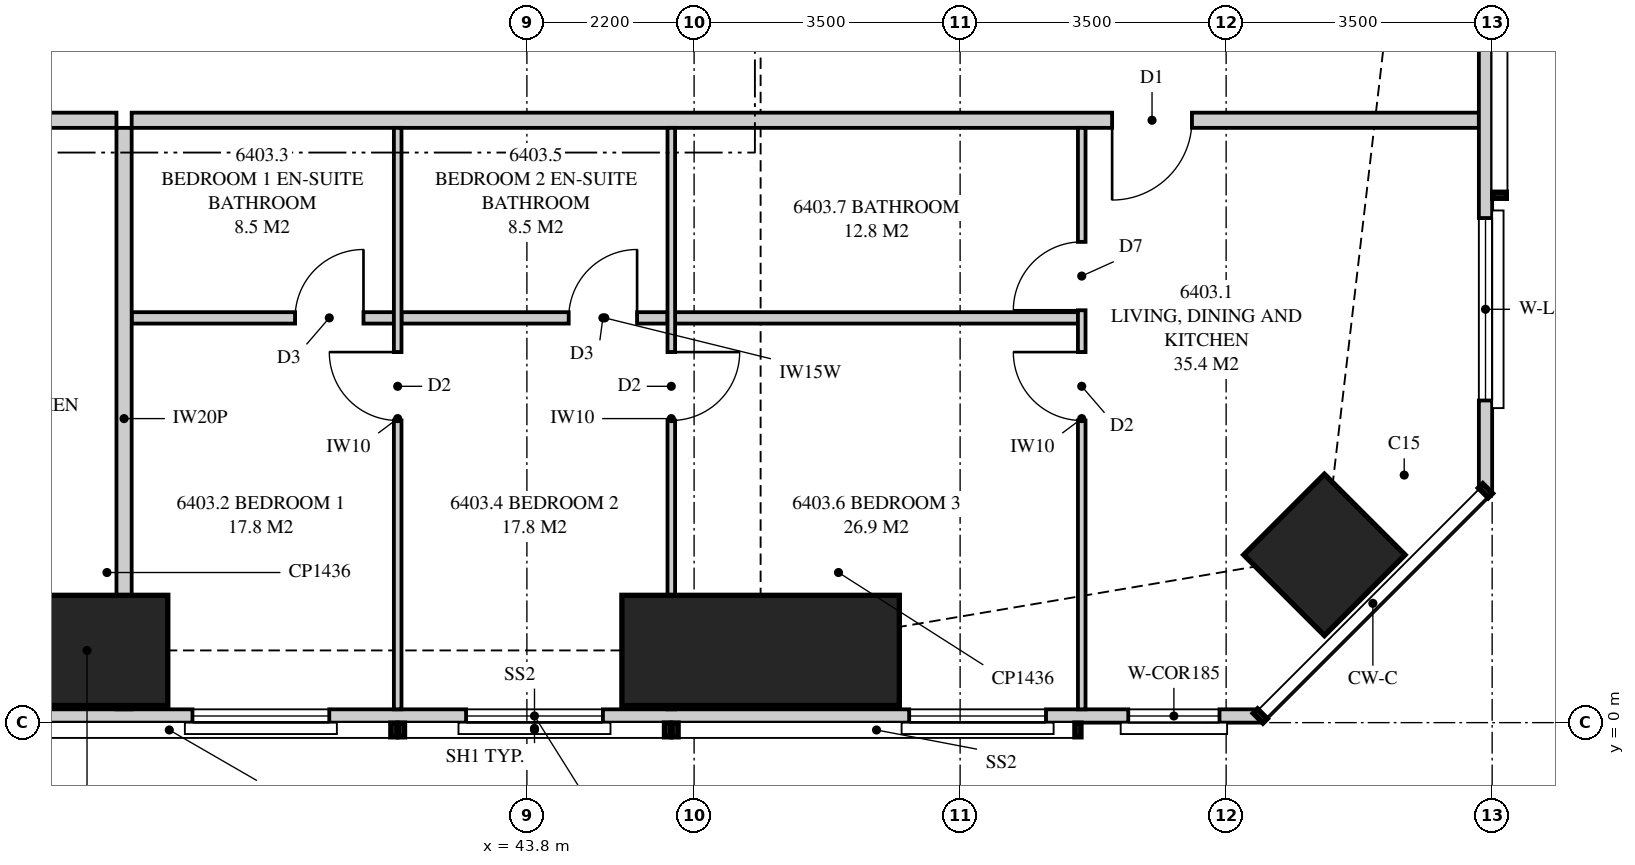
"""IFC4 building model, lengths in metres.
Left out: names, types, materials, properties, quantities, classifications, styles, units other than length and angle.
Written with IfcOpenShell. Run it as: python <this file> out.ifc"""

import sys

from ifc_helpers import new_model, si_unit, direction, frame, frame_2d, origin, origin_2d, place, context, subcontext, project, spatial, polyline, rectangle, outline, extrude, element, fill, save


model = new_model("IFC4")
c1 = context("Model", 3, precision=1e-05, world=origin(), true_north=direction((0.0, 1.0)))
c2 = subcontext(c1, "Body", "Model", "MODEL_VIEW")
j1 = project(units=[si_unit("LENGTHUNIT", "METRE"), si_unit("PLANEANGLEUNIT", "RADIAN")], contexts=[c1])
p1 = place(None, origin())
s1 = spatial("IfcSite", under=j1, at=p1, CompositionType="ELEMENT")
p2 = place(p1, origin())
s2 = spatial("IfcBuilding", under=s1, at=p2, CompositionType="ELEMENT")
p3 = place(p2, frame((0.0, 0.0, 235.45)))
s3 = spatial("IfcBuildingStorey", under=s2, at=p3, CompositionType="ELEMENT", Elevation=235.45)
for number, where, z_axis, x_axis in (
    (1, (37.25, 0.95, 0.0), (0.0, 0.0, 1.0), (0.0, 1.0, 0.0)),
    (2, (46.875, 0.95, 0.0), (0.0, 0.0, 1.0), (0.0, 1.0, 0.0)),
):
    element("IfcColumn", number, at=place(p3, frame(where, z_axis=z_axis, x_axis=x_axis)), inside=s3, PredefinedType="COLUMN", context=c2, shape_type="SweptSolid", body=[
        extrude(rectangle(XDim=1.45, YDim=3.65, at=origin_2d()), origin(), (0.0, 0.0, 1.0), 3.5),
    ])
p4 = place(p3, frame((54.293, 2.207, 0.0), z_axis=(0.0, 0.0, 1.0), x_axis=(0.707106781187, 0.707106781187, 0.0)))
e3 = element("IfcColumn", 3, at=p4, inside=s3, PredefinedType="COLUMN", context=c2, shape_type="SweptSolid", body=[
    extrude(rectangle(XDim=1.5, YDim=1.5, at=origin_2d()), origin(), (0.0, 0.0, 1.0), 3.5),
])
p5 = place(p3, frame((19.851, 0.087, 0.0), z_axis=(0.0, 0.0, 1.0), x_axis=(1.0, 0.0, 0.0)))
e4 = element("IfcWall", 4, at=p5, inside=s3, PredefinedType="SOLIDWALL", context=c2, shape_type="SweptSolid", body=[
    extrude(outline(polyline([(0.0, 0.0), (33.597, 0.0), (33.597, 3.26), (27.239, 3.26), (27.239, 2.3), (27.155, 2.3), (27.155, 3.26), (27.024, 3.26), (27.024, 2.3), (7.774, 2.3), (7.774, 3.26), (7.642, 3.26), (7.642, 2.3), (7.559, 2.3), (7.559, 3.26), (0.0, 3.26), (0.0, 0.0)])), frame((0.0, 0.087, 0.0), z_axis=(0.0, -1.0, 0.0), x_axis=(1.0, 0.0, 0.0)), (0.0, 0.0, 1.0), 0.175),
])
p6 = place(p5, frame((3.373, 0.0, 0.4)))
e5 = element("IfcOpeningElement", 5, at=p6, cuts=e4, PredefinedType="OPENING", context=c2, shape_type="SweptSolid", body=[
    extrude(rectangle(XDim=2.4, YDim=1.85, at=frame_2d((1.2, 0.925))), frame((0.0, 0.097, 0.0), z_axis=(0.0, -1.0, 0.0), x_axis=(1.0, 0.0, 0.0)), (0.0, 0.0, 1.0), 0.195),
])
p7 = place(p5, frame((10.349, 0.0, 0.4)))
e6 = element("IfcOpeningElement", 6, at=p7, cuts=e4, PredefinedType="OPENING", context=c2, shape_type="SweptSolid", body=[
    extrude(rectangle(XDim=1.8, YDim=1.85, at=frame_2d((0.9, 0.925))), frame((0.0, 0.097, 0.0), z_axis=(0.0, -1.0, 0.0), x_axis=(1.0, 0.0, 0.0)), (0.0, 0.0, 1.0), 0.195),
])
p8 = place(p5, frame((13.289, 0.0, 0.0)))
e7 = element("IfcOpeningElement", 7, at=p8, cuts=e4, PredefinedType="OPENING", context=c2, shape_type="SweptSolid", body=[
    extrude(rectangle(XDim=1.8, YDim=2.25, at=frame_2d((0.9, 1.125))), frame((0.0, 0.097, 0.0), z_axis=(0.0, -1.0, 0.0), x_axis=(1.0, 0.0, 0.0)), (0.0, 0.0, 1.0), 0.195),
])
p9 = place(p5, frame((19.549, 0.0, 0.4)))
e8 = element("IfcOpeningElement", 8, at=p9, cuts=e4, PredefinedType="OPENING", context=c2, shape_type="SweptSolid", body=[
    extrude(rectangle(XDim=1.8, YDim=1.85, at=frame_2d((0.9, 0.925))), frame((0.0, 0.097, 0.0), z_axis=(0.0, -1.0, 0.0), x_axis=(1.0, 0.0, 0.0)), (0.0, 0.0, 1.0), 0.195),
])
p10 = place(p5, frame((23.149, 0.0, 0.4)))
e9 = element("IfcOpeningElement", 9, at=p10, cuts=e4, PredefinedType="OPENING", context=c2, shape_type="SweptSolid", body=[
    extrude(rectangle(XDim=1.8, YDim=1.85, at=frame_2d((0.9, 0.925))), frame((0.0, 0.097, 0.0), z_axis=(0.0, -1.0, 0.0), x_axis=(1.0, 0.0, 0.0)), (0.0, 0.0, 1.0), 0.195),
])
p11 = place(p5, frame((28.979, 0.0, 0.4)))
e10 = element("IfcOpeningElement", 10, at=p11, cuts=e4, PredefinedType="OPENING", context=c2, shape_type="SweptSolid", body=[
    extrude(rectangle(XDim=1.8, YDim=1.85, at=frame_2d((0.9, 0.925))), frame((0.0, 0.097, 0.0), z_axis=(0.0, -1.0, 0.0), x_axis=(1.0, 0.0, 0.0)), (0.0, 0.0, 1.0), 0.195),
])
p12 = place(p5, frame((31.861, 0.0, 0.4)))
e11 = element("IfcOpeningElement", 11, at=p12, cuts=e4, PredefinedType="OPENING", context=c2, shape_type="SweptSolid", body=[
    extrude(rectangle(XDim=1.2, YDim=1.85, at=frame_2d((0.6, 0.925))), frame((0.0, 0.097, 0.0), z_axis=(0.0, -1.0, 0.0), x_axis=(1.0, 0.0, 0.0)), (0.0, 0.0, 1.0), 0.195),
])
p13 = place(p3, frame((56.413, 3.051, 0.0), z_axis=(0.0, 0.0, 1.0), x_axis=(0.0, 1.0, 0.0)))
e12 = element("IfcWall", 12, at=p13, inside=s3, PredefinedType="SOLIDWALL", context=c2, shape_type="SweptSolid", body=[
    extrude(outline(polyline([(0.0, 0.0), (27.897, 0.0), (27.897, 3.26), (22.157, 3.26), (22.157, 2.3), (22.092, 2.3), (22.092, 3.26), (21.949, 3.26), (21.949, 2.3), (9.949, 2.3), (9.949, 3.26), (9.858, 3.26), (9.858, 2.3), (9.688, 2.3), (9.688, 3.26), (0.0, 3.26), (0.0, 0.0)])), frame((0.0, 0.087, 0.0), z_axis=(0.0, -1.0, 0.0), x_axis=(1.0, 0.0, 0.0)), (0.0, 0.0, 1.0), 0.175),
])
p14 = place(p13, frame((1.187, 0.0, 0.4)))
e13 = element("IfcOpeningElement", 13, at=p14, cuts=e12, PredefinedType="OPENING", context=c2, shape_type="SweptSolid", body=[
    extrude(rectangle(XDim=2.4, YDim=1.85, at=frame_2d((1.2, 0.925))), frame((0.0, 0.097, 0.0), z_axis=(0.0, -1.0, 0.0), x_axis=(1.0, 0.0, 0.0)), (0.0, 0.0, 1.0), 0.195),
])
p15 = place(p13, frame((11.897, 0.0, 0.4)))
e14 = element("IfcOpeningElement", 14, at=p15, cuts=e12, PredefinedType="OPENING", context=c2, shape_type="SweptSolid", body=[
    extrude(rectangle(XDim=1.8, YDim=1.85, at=frame_2d((0.9, 0.925))), frame((0.0, 0.097, 0.0), z_axis=(0.0, -1.0, 0.0), x_axis=(1.0, 0.0, 0.0)), (0.0, 0.0, 1.0), 0.195),
])
p16 = place(p13, frame((14.824, 0.0, 0.0)))
e15 = element("IfcOpeningElement", 15, at=p16, cuts=e12, PredefinedType="OPENING", context=c2, shape_type="SweptSolid", body=[
    extrude(rectangle(XDim=1.8, YDim=2.25, at=frame_2d((0.9, 1.125))), frame((0.0, 0.097, 0.0), z_axis=(0.0, -1.0, 0.0), x_axis=(1.0, 0.0, 0.0)), (0.0, 0.0, 1.0), 0.195),
])
p17 = place(p13, frame((18.224, 0.0, 0.4)))
e16 = element("IfcOpeningElement", 16, at=p17, cuts=e12, PredefinedType="OPENING", context=c2, shape_type="SweptSolid", body=[
    extrude(rectangle(XDim=1.8, YDim=1.85, at=frame_2d((0.9, 0.925))), frame((0.0, 0.097, 0.0), z_axis=(0.0, -1.0, 0.0), x_axis=(1.0, 0.0, 0.0)), (0.0, 0.0, 1.0), 0.195),
])
p18 = place(p3, frame((38.5, 0.175, 0.0), z_axis=(0.0, 0.0, 1.0), x_axis=(0.0, 1.0, 0.0)))
e17 = element("IfcWall", 17, at=p18, inside=s3, PredefinedType="PARTITIONING", context=c2, shape_type="SweptSolid", body=[
    extrude(outline(polyline([(0.529, 2.3), (0.0, 2.3), (0.0, 0.0), (0.529, 0.0), (0.529, 0.281), (1.021, 0.281), (1.021, 0.0), (7.65, 0.0), (7.65, 2.66), (1.685, 2.66), (1.685, 2.3), (1.021, 2.3), (1.021, 2.019), (0.529, 2.019), (0.529, 2.3)])), frame((0.0, 0.1, 0.0), z_axis=(0.0, -1.0, 0.0), x_axis=(1.0, 0.0, 0.0)), (0.0, 0.0, 1.0), 0.2),
])
p19 = place(p3, frame((29.4, 7.925, 0.0), z_axis=(0.0, 0.0, 1.0), x_axis=(1.0, 0.0, 0.0)))
e18 = element("IfcWall", 18, at=p19, inside=s3, PredefinedType="PARTITIONING", context=c2, shape_type="SweptSolid", body=[
    extrude(outline(polyline([(0.0, 0.0), (9.0, 0.0), (9.0, 3.26), (9.0, 2.66), (6.54, 2.66), (6.54, 3.26), (0.0, 3.26), (0.0, 0.0)])), frame((0.0, 0.1, 0.0), z_axis=(0.0, -1.0, 0.0), x_axis=(1.0, 0.0, 0.0)), (0.0, 0.0, 1.0), 0.2),
])
p20 = place(p19, frame((4.0, 0.0, 0.0)))
e19 = element("IfcOpeningElement", 19, at=p20, cuts=e18, PredefinedType="OPENING", context=c2, shape_type="SweptSolid", body=[
    extrude(rectangle(XDim=1.05, YDim=2.2, at=frame_2d((0.525, 1.1))), frame((0.0, 0.11, 0.0), z_axis=(0.0, -1.0, 0.0), x_axis=(1.0, 0.0, 0.0)), (0.0, 0.0, 1.0), 0.22),
])
p21 = place(p3, frame((38.6, 7.925, 0.0), z_axis=(0.0, 0.0, 1.0), x_axis=(1.0, 0.0, 0.0)))
e20 = element("IfcWall", 20, at=p21, inside=s3, PredefinedType="PARTITIONING", context=c2, shape_type="SweptSolid", body=[
    extrude(outline(polyline([(0.0, 0.0), (17.725, 0.0), (17.725, 3.26), (17.275, 3.26), (17.275, 2.3), (15.443, 2.3), (15.443, 3.26), (9.585, 3.26), (9.585, 2.66), (6.965, 2.66), (6.965, 3.26), (0.0, 3.26), (0.0, 0.0)])), frame((0.0, 0.1, 0.0), z_axis=(0.0, -1.0, 0.0), x_axis=(1.0, 0.0, 0.0)), (0.0, 0.0, 1.0), 0.2),
])
p22 = place(p21, frame((12.9, 0.0, 0.0)))
e21 = element("IfcOpeningElement", 21, at=p22, cuts=e20, PredefinedType="OPENING", context=c2, shape_type="SweptSolid", body=[
    extrude(rectangle(XDim=1.05, YDim=2.2, at=frame_2d((0.525, 1.1))), frame((0.0, 0.11, 0.0), z_axis=(0.0, -1.0, 0.0), x_axis=(1.0, 0.0, 0.0)), (0.0, 0.0, 1.0), 0.22),
])
p23 = place(p3, frame((42.1, 0.175, 0.0), z_axis=(0.0, 0.0, 1.0), x_axis=(0.0, 1.0, 0.0)))
e22 = element("IfcWall", 22, at=p23, inside=s3, PredefinedType="PARTITIONING", context=c2, shape_type="SweptSolid", body=[
    extrude(outline(polyline([(0.0, 0.0), (7.65, 0.0), (7.65, 3.26), (1.635, 3.26), (1.635, 2.3), (0.0, 2.3), (0.0, 3.26), (0.0, 0.0)])), frame((0.0, 0.05, 0.0), z_axis=(0.0, -1.0, 0.0), x_axis=(1.0, 0.0, 0.0)), (0.0, 0.0, 1.0), 0.1),
])
p24 = place(p23, frame((3.8, 0.0, 0.0)))
e23 = element("IfcOpeningElement", 23, at=p24, cuts=e22, PredefinedType="OPENING", context=c2, shape_type="SweptSolid", body=[
    extrude(rectangle(XDim=0.9, YDim=2.1, at=frame_2d((0.45, 1.05))), frame((0.0, 0.06, 0.0), z_axis=(0.0, -1.0, 0.0), x_axis=(1.0, 0.0, 0.0)), (0.0, 0.0, 1.0), 0.12),
])
p25 = place(p3, frame((45.7, 0.175, 0.0), z_axis=(0.0, 0.0, 1.0), x_axis=(0.0, 1.0, 0.0)))
e24 = element("IfcWall", 24, at=p25, inside=s3, PredefinedType="PARTITIONING", context=c2, shape_type="SweptSolid", body=[
    extrude(outline(polyline([(0.529, 2.3), (0.0, 2.3), (0.0, 0.0), (0.529, 0.0), (0.529, 0.31), (1.021, 0.31), (1.021, 0.0), (7.65, 0.0), (7.65, 2.66), (1.635, 2.66), (1.635, 2.3), (1.021, 2.3), (1.021, 1.99), (0.529, 1.99), (0.529, 2.3)])), frame((0.0, 0.05, 0.0), z_axis=(0.0, -1.0, 0.0), x_axis=(1.0, 0.0, 0.0)), (0.0, 0.0, 1.0), 0.1),
])
p26 = place(p25, frame((3.8, 0.0, 0.0)))
e25 = element("IfcOpeningElement", 25, at=p26, cuts=e24, PredefinedType="OPENING", context=c2, shape_type="SweptSolid", body=[
    extrude(rectangle(XDim=0.9, YDim=2.1, at=frame_2d((0.45, 1.05))), frame((0.0, 0.06, 0.0), z_axis=(0.0, -1.0, 0.0), x_axis=(1.0, 0.0, 0.0)), (0.0, 0.0, 1.0), 0.12),
])
p27 = place(p3, frame((51.1, 0.175, 0.0), z_axis=(0.0, 0.0, 1.0), x_axis=(0.0, 1.0, 0.0)))
e26 = element("IfcWall", 26, at=p27, inside=s3, PredefinedType="PARTITIONING", context=c2, shape_type="SweptSolid", body=[
    extrude(outline(polyline([(0.0, 0.0), (7.65, 0.0), (7.65, 3.26), (2.363, 3.26), (2.363, 2.3), (0.619, 2.3), (0.619, 3.26), (0.0, 3.26), (0.0, 0.0)])), frame((0.0, 0.05, 0.0), z_axis=(0.0, -1.0, 0.0), x_axis=(1.0, 0.0, 0.0)), (0.0, 0.0, 1.0), 0.1),
])
p28 = place(p27, frame((3.8, 0.0, 0.0)))
e27 = element("IfcOpeningElement", 27, at=p28, cuts=e26, PredefinedType="OPENING", context=c2, shape_type="SweptSolid", body=[
    extrude(rectangle(XDim=0.9, YDim=2.1, at=frame_2d((0.45, 1.05))), frame((0.0, 0.06, 0.0), z_axis=(0.0, -1.0, 0.0), x_axis=(1.0, 0.0, 0.0)), (0.0, 0.0, 1.0), 0.12),
])
p29 = place(p27, frame((5.25, 0.0, 0.0)))
e28 = element("IfcOpeningElement", 28, at=p29, cuts=e26, PredefinedType="OPENING", context=c2, shape_type="SweptSolid", body=[
    extrude(rectangle(XDim=0.9, YDim=2.1, at=frame_2d((0.45, 1.05))), frame((0.0, 0.06, 0.0), z_axis=(0.0, -1.0, 0.0), x_axis=(1.0, 0.0, 0.0)), (0.0, 0.0, 1.0), 0.12),
])
p30 = place(p3, frame((38.6, 5.325, 0.0), z_axis=(0.0, 0.0, 1.0), x_axis=(1.0, 0.0, 0.0)))
e29 = element("IfcWall", 29, at=p30, inside=s3, PredefinedType="PLUMBINGWALL", context=c2, shape_type="SweptSolid", body=[
    extrude(rectangle(XDim=3.45, YDim=0.15, at=frame_2d((1.725, 0.0))), origin(), (0.0, 0.0, 1.0), 3.26),
])
p31 = place(p30, frame((2.15, 0.0, 0.0)))
e30 = element("IfcOpeningElement", 30, at=p31, cuts=e29, PredefinedType="OPENING", context=c2, shape_type="SweptSolid", body=[
    extrude(rectangle(XDim=0.9, YDim=2.1, at=frame_2d((0.45, 1.05))), frame((0.0, 0.085, 0.0), z_axis=(0.0, -1.0, 0.0), x_axis=(1.0, 0.0, 0.0)), (0.0, 0.0, 1.0), 0.17),
])
p32 = place(p3, frame((42.15, 5.325, 0.0), z_axis=(0.0, 0.0, 1.0), x_axis=(1.0, 0.0, 0.0)))
e31 = element("IfcWall", 31, at=p32, inside=s3, PredefinedType="PLUMBINGWALL", context=c2, shape_type="SweptSolid", body=[
    extrude(outline(polyline([(0.0, 0.0), (3.5, 0.0), (3.5, 3.26), (3.5, 2.66), (3.44, 2.66), (3.44, 3.26), (0.0, 3.26), (0.0, 0.0)])), frame((0.0, 0.075, 0.0), z_axis=(0.0, -1.0, 0.0), x_axis=(1.0, 0.0, 0.0)), (0.0, 0.0, 1.0), 0.15),
])
p33 = place(p32, frame((2.2, 0.0, 0.0)))
e32 = element("IfcOpeningElement", 32, at=p33, cuts=e31, PredefinedType="OPENING", context=c2, shape_type="SweptSolid", body=[
    extrude(rectangle(XDim=0.9, YDim=2.1, at=frame_2d((0.45, 1.05))), frame((0.0, 0.085, 0.0), z_axis=(0.0, -1.0, 0.0), x_axis=(1.0, 0.0, 0.0)), (0.0, 0.0, 1.0), 0.17),
])
p34 = place(p3, frame((45.75, 5.325, 0.0), z_axis=(0.0, 0.0, 1.0), x_axis=(1.0, 0.0, 0.0)))
e33 = element("IfcWall", 33, at=p34, inside=s3, PredefinedType="PLUMBINGWALL", context=c2, shape_type="SweptSolid", body=[
    extrude(outline(polyline([(0.0, 0.0), (5.3, 0.0), (5.3, 3.26), (2.41, 3.26), (2.41, 2.66), (0.0, 2.66), (0.0, 3.26), (0.0, 0.0)])), frame((0.0, 0.075, 0.0), z_axis=(0.0, -1.0, 0.0), x_axis=(1.0, 0.0, 0.0)), (0.0, 0.0, 1.0), 0.15),
])
p35 = place(p9, origin())
e34 = element("IfcWindow", 34, at=p35, inside=s3, PartitioningType="SINGLE_PANEL", PredefinedType="WINDOW", context=c2, shape_type="SweptSolid", body=[
    extrude(rectangle(XDim=1.8, YDim=1.85, at=frame_2d((0.9, 0.925))), frame((0.0, 0.03, 0.0), z_axis=(0.0, -1.0, 0.0), x_axis=(1.0, 0.0, 0.0)), (0.0, 0.0, 1.0), 0.06),
])
fill(e8, e34)
p36 = place(p10, origin())
e35 = element("IfcWindow", 35, at=p36, inside=s3, PartitioningType="SINGLE_PANEL", PredefinedType="WINDOW", context=c2, shape_type="SweptSolid", body=[
    extrude(rectangle(XDim=1.8, YDim=1.85, at=frame_2d((0.9, 0.925))), frame((0.0, 0.03, 0.0), z_axis=(0.0, -1.0, 0.0), x_axis=(1.0, 0.0, 0.0)), (0.0, 0.0, 1.0), 0.06),
])
fill(e9, e35)
p37 = place(p11, origin())
e36 = element("IfcWindow", 36, at=p37, inside=s3, PartitioningType="SINGLE_PANEL", PredefinedType="WINDOW", context=c2, shape_type="SweptSolid", body=[
    extrude(rectangle(XDim=1.8, YDim=1.85, at=frame_2d((0.9, 0.925))), frame((0.0, 0.03, 0.0), z_axis=(0.0, -1.0, 0.0), x_axis=(1.0, 0.0, 0.0)), (0.0, 0.0, 1.0), 0.06),
])
fill(e10, e36)
p38 = place(p12, origin())
e37 = element("IfcWindow", 37, at=p38, inside=s3, PartitioningType="SINGLE_PANEL", PredefinedType="WINDOW", context=c2, shape_type="SweptSolid", body=[
    extrude(rectangle(XDim=1.2, YDim=1.85, at=frame_2d((0.6, 0.925))), frame((0.0, 0.03, 0.0), z_axis=(0.0, -1.0, 0.0), x_axis=(1.0, 0.0, 0.0)), (0.0, 0.0, 1.0), 0.06),
])
fill(e11, e37)
p39 = place(p14, origin())
e38 = element("IfcWindow", 38, at=p39, inside=s3, PartitioningType="SINGLE_PANEL", PredefinedType="WINDOW", context=c2, shape_type="SweptSolid", body=[
    extrude(rectangle(XDim=2.4, YDim=1.85, at=frame_2d((1.2, 0.925))), frame((0.0, 0.03, 0.0), z_axis=(0.0, -1.0, 0.0), x_axis=(1.0, 0.0, 0.0)), (0.0, 0.0, 1.0), 0.06),
])
fill(e13, e38)
p40 = place(p22, frame((1.05, 0.0, 0.0), z_axis=(0.0, 0.0, 1.0), x_axis=(-1.0, 0.0, 0.0)))
e39 = element("IfcDoor", 39, at=p40, inside=s3, OperationType="SINGLE_SWING_RIGHT", PredefinedType="DOOR", context=c2, shape_type="SweptSolid", body=[
    extrude(rectangle(XDim=1.05, YDim=2.2, at=frame_2d((0.525, 1.1))), frame((0.0, 0.025, 0.0), z_axis=(0.0, -1.0, 0.0), x_axis=(1.0, 0.0, 0.0)), (0.0, 0.0, 1.0), 0.05),
])
fill(e21, e39)
p41 = place(p24, origin())
e40 = element("IfcDoor", 40, at=p41, inside=s3, OperationType="SINGLE_SWING_RIGHT", PredefinedType="DOOR", context=c2, shape_type="SweptSolid", body=[
    extrude(rectangle(XDim=0.9, YDim=2.1, at=frame_2d((0.45, 1.05))), frame((0.0, 0.025, 0.0), z_axis=(0.0, -1.0, 0.0), x_axis=(1.0, 0.0, 0.0)), (0.0, 0.0, 1.0), 0.05),
])
fill(e23, e40)
p42 = place(p31, origin())
e41 = element("IfcDoor", 41, at=p42, inside=s3, OperationType="SINGLE_SWING_RIGHT", PredefinedType="DOOR", context=c2, shape_type="SweptSolid", body=[
    extrude(rectangle(XDim=0.9, YDim=2.1, at=frame_2d((0.45, 1.05))), frame((0.0, 0.025, 0.0), z_axis=(0.0, -1.0, 0.0), x_axis=(1.0, 0.0, 0.0)), (0.0, 0.0, 1.0), 0.05),
])
fill(e30, e41)
p43 = place(p26, frame((0.9, 0.0, 0.0), z_axis=(0.0, 0.0, 1.0), x_axis=(-1.0, 0.0, 0.0)))
e42 = element("IfcDoor", 42, at=p43, inside=s3, OperationType="SINGLE_SWING_LEFT", PredefinedType="DOOR", context=c2, shape_type="SweptSolid", body=[
    extrude(rectangle(XDim=0.9, YDim=2.1, at=frame_2d((0.45, 1.05))), frame((0.0, 0.025, 0.0), z_axis=(0.0, -1.0, 0.0), x_axis=(1.0, 0.0, 0.0)), (0.0, 0.0, 1.0), 0.05),
])
fill(e25, e42)
p44 = place(p33, origin())
e43 = element("IfcDoor", 43, at=p44, inside=s3, OperationType="SINGLE_SWING_RIGHT", PredefinedType="DOOR", context=c2, shape_type="SweptSolid", body=[
    extrude(rectangle(XDim=0.9, YDim=2.1, at=frame_2d((0.45, 1.05))), frame((0.0, 0.025, 0.0), z_axis=(0.0, -1.0, 0.0), x_axis=(1.0, 0.0, 0.0)), (0.0, 0.0, 1.0), 0.05),
])
fill(e32, e43)
p45 = place(p28, origin())
e44 = element("IfcDoor", 44, at=p45, inside=s3, OperationType="SINGLE_SWING_RIGHT", PredefinedType="DOOR", context=c2, shape_type="SweptSolid", body=[
    extrude(rectangle(XDim=0.9, YDim=2.1, at=frame_2d((0.45, 1.05))), frame((0.0, 0.025, 0.0), z_axis=(0.0, -1.0, 0.0), x_axis=(1.0, 0.0, 0.0)), (0.0, 0.0, 1.0), 0.05),
])
fill(e27, e44)
p46 = place(p29, origin())
e45 = element("IfcDoor", 45, at=p46, inside=s3, OperationType="SINGLE_SWING_LEFT", PredefinedType="DOOR", context=c2, shape_type="SweptSolid", body=[
    extrude(rectangle(XDim=0.9, YDim=2.1, at=frame_2d((0.45, 1.05))), frame((0.0, 0.025, 0.0), z_axis=(0.0, -1.0, 0.0), x_axis=(1.0, 0.0, 0.0)), (0.0, 0.0, 1.0), 0.05),
])
fill(e28, e45)
save(model, sys.argv[1])
